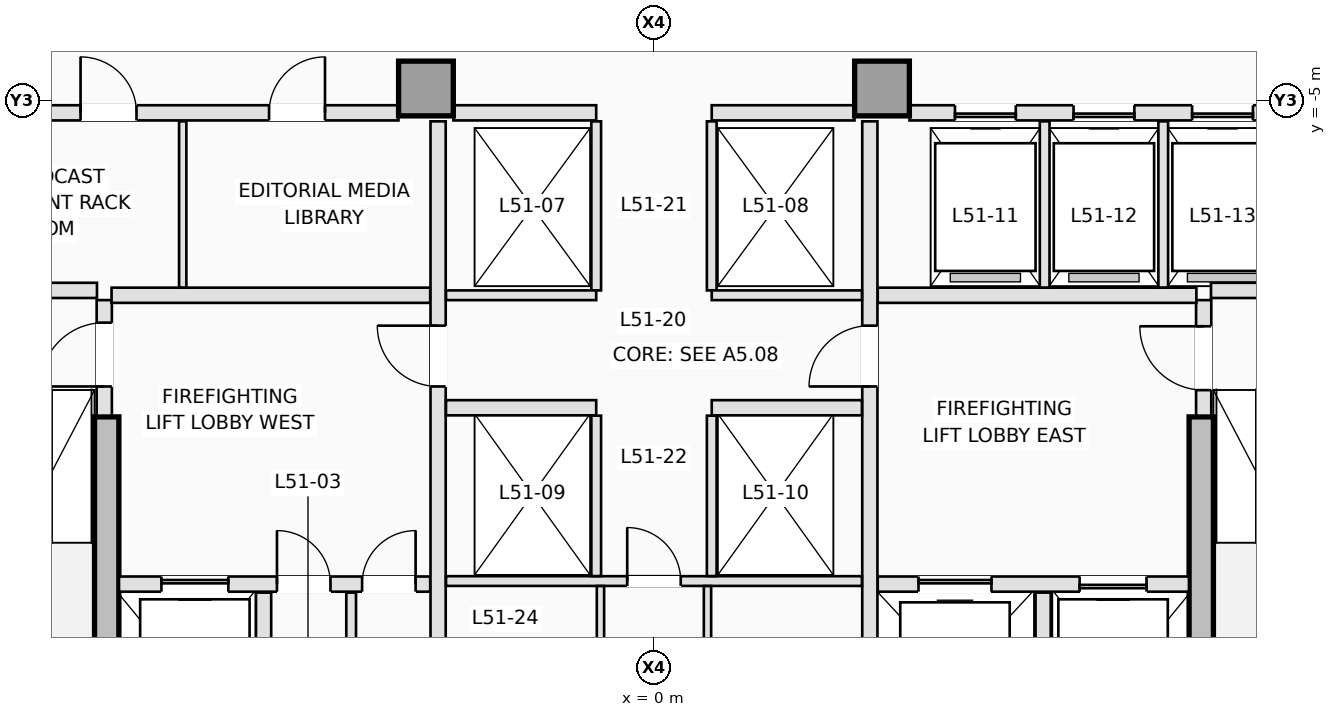
"""IFC4 building model, lengths in metres.
Left out: names, types, materials, properties, quantities, classifications, styles, units other than length and angle.
Written with IfcOpenShell. Run it as: python <this file> out.ifc"""

import sys

from ifc_helpers import new_model, si_unit, direction, frame, frame_2d, origin, origin_2d, place, context, subcontext, project, spatial, rectangle, extrude, element, fill, save


model = new_model("IFC4")
c1 = context("Model", 3, precision=1e-05, world=origin(), true_north=direction((0.0, 1.0)))
c2 = subcontext(c1, "Body", "Model", "MODEL_VIEW")
j1 = project(units=[si_unit("LENGTHUNIT", "METRE"), si_unit("PLANEANGLEUNIT", "RADIAN")], contexts=[c1])
p1 = place(None, origin())
s1 = spatial("IfcSite", under=j1, at=p1, CompositionType="ELEMENT")
p2 = place(p1, origin())
s2 = spatial("IfcBuilding", under=s1, at=p2, CompositionType="ELEMENT")
p3 = place(p2, frame((0.0, 0.0, 186.9)))
s3 = spatial("IfcBuildingStorey", under=s2, at=p3, CompositionType="ELEMENT", Elevation=186.9)
for number, where, z_axis, x_axis in (
    (1, (-9.0, -16.15, 0.0), (0.0, 0.0, 1.0), (0.0, 1.0, 0.0)),
    (2, (9.0, -16.15, 0.0), (0.0, 0.0, 1.0), (0.0, 1.0, 0.0)),
):
    element("IfcWall", number, at=place(p3, frame(where, z_axis=z_axis, x_axis=x_axis)), inside=s3, PredefinedType="SHEAR", context=c2, shape_type="SweptSolid", body=[
        extrude(rectangle(XDim=5.95, YDim=0.4, at=frame_2d((2.975, 0.0))), origin(), (0.0, 0.0, 1.0), 3.5),
    ])
for number, where, z_axis, x_axis in (
    (3, (-3.75, -4.8, 0.0), (0.0, 0.0, 1.0), (1.0, 0.0, 0.0)),
    (4, (3.75, -4.8, 0.0), (0.0, 0.0, 1.0), (1.0, 0.0, 0.0)),
):
    element("IfcColumn", number, at=place(p3, frame(where, z_axis=z_axis, x_axis=x_axis)), inside=s3, PredefinedType="COLUMN", context=c2, shape_type="SweptSolid", body=[
        extrude(rectangle(XDim=0.9, YDim=0.9, at=origin_2d()), origin(), (0.0, 0.0, 1.0), 3.5),
    ])
p4 = place(p3, frame((-9.04, -10.18, 0.0), z_axis=(0.0, 0.0, 1.0), x_axis=(0.0, 1.0, 0.0)))
e5 = element("IfcWall", 5, at=p4, inside=s3, PredefinedType="PARTITIONING", context=c2, shape_type="SweptSolid", body=[
    extrude(rectangle(XDim=1.9, YDim=0.25, at=frame_2d((0.95, 0.0))), origin(), (0.0, 0.0, 1.0), 3.25),
])
p5 = place(p4, frame((0.48, 0.0, 0.0)))
e6 = element("IfcOpeningElement", 6, at=p5, cuts=e5, PredefinedType="OPENING", context=c2, shape_type="SweptSolid", body=[
    extrude(rectangle(XDim=1.05, YDim=2.15, at=frame_2d((0.525, 1.075))), frame((0.0, 0.135, 0.0), z_axis=(0.0, -1.0, 0.0), x_axis=(1.0, 0.0, 0.0)), (0.0, 0.0, 1.0), 0.27),
])
p6 = place(p3, frame((9.04, -10.18, 0.0), z_axis=(0.0, 0.0, 1.0), x_axis=(0.0, 1.0, 0.0)))
e7 = element("IfcWall", 7, at=p6, inside=s3, PredefinedType="PARTITIONING", context=c2, shape_type="SweptSolid", body=[
    extrude(rectangle(XDim=1.9, YDim=0.25, at=frame_2d((0.95, 0.0))), origin(), (0.0, 0.0, 1.0), 3.25),
])
p7 = place(p6, frame((0.42, 0.0, 0.0)))
e8 = element("IfcOpeningElement", 8, at=p7, cuts=e7, PredefinedType="OPENING", context=c2, shape_type="SweptSolid", body=[
    extrude(rectangle(XDim=1.05, YDim=2.15, at=frame_2d((0.525, 1.075))), frame((0.0, 0.135, 0.0), z_axis=(0.0, -1.0, 0.0), x_axis=(1.0, 0.0, 0.0)), (0.0, 0.0, 1.0), 0.27),
])
for number, where, z_axis, x_axis in (
    (9, (-12.38, -8.12, 0.0), (0.0, 0.0, 1.0), (1.0, 0.0, 0.0)),
    (10, (9.16, -8.12, 0.0), (0.0, 0.0, 1.0), (1.0, 0.0, 0.0)),
):
    element("IfcWall", number, at=place(p3, frame(where, z_axis=z_axis, x_axis=x_axis)), inside=s3, PredefinedType="PARTITIONING", context=c2, shape_type="SweptSolid", body=[
        extrude(rectangle(XDim=3.22, YDim=0.25, at=frame_2d((1.61, 0.0))), origin(), (0.0, 0.0, 1.0), 3.25),
    ])
p8 = place(p3, frame((-8.798, -12.95, 0.0), z_axis=(0.0, 0.0, 1.0), x_axis=(1.0, 0.0, 0.0)))
e11 = element("IfcWall", 11, at=p8, inside=s3, PredefinedType="PARTITIONING", context=c2, shape_type="SweptSolid", body=[
    extrude(rectangle(XDim=5.118, YDim=0.25, at=frame_2d((2.559, 0.0))), origin(), (0.0, 0.0, 1.0), 3.25),
])
p9 = place(p8, frame((0.698, 0.0, 0.0)))
e12 = element("IfcOpeningElement", 12, at=p9, cuts=e11, PredefinedType="OPENING", context=c2, shape_type="SweptSolid", body=[
    extrude(rectangle(XDim=1.1, YDim=2.15, at=frame_2d((0.55, 1.075))), frame((0.0, 0.135, 0.0), z_axis=(0.0, -1.0, 0.0), x_axis=(1.0, 0.0, 0.0)), (0.0, 0.0, 1.0), 0.27),
])
p10 = place(p8, frame((2.598, 0.0, 0.0)))
e13 = element("IfcOpeningElement", 13, at=p10, cuts=e11, PredefinedType="OPENING", context=c2, shape_type="SweptSolid", body=[
    extrude(rectangle(XDim=0.88, YDim=2.1, at=frame_2d((0.44, 1.05))), frame((0.0, 0.135, 0.0), z_axis=(0.0, -1.0, 0.0), x_axis=(1.0, 0.0, 0.0)), (0.0, 0.0, 1.0), 0.27),
])
p11 = place(p8, frame((3.998, 0.0, 0.0)))
e14 = element("IfcOpeningElement", 14, at=p11, cuts=e11, PredefinedType="OPENING", context=c2, shape_type="SweptSolid", body=[
    extrude(rectangle(XDim=0.88, YDim=2.1, at=frame_2d((0.44, 1.05))), frame((0.0, 0.135, 0.0), z_axis=(0.0, -1.0, 0.0), x_axis=(1.0, 0.0, 0.0)), (0.0, 0.0, 1.0), 0.27),
])
p12 = place(p3, frame((3.68, -12.95, 0.0), z_axis=(0.0, 0.0, 1.0), x_axis=(1.0, 0.0, 0.0)))
e15 = element("IfcWall", 15, at=p12, inside=s3, PredefinedType="PARTITIONING", context=c2, shape_type="SweptSolid", body=[
    extrude(rectangle(XDim=5.118, YDim=0.25, at=frame_2d((2.559, 0.0))), origin(), (0.0, 0.0, 1.0), 3.25),
])
p13 = place(p12, frame((3.32, 0.0, 0.0)))
e16 = element("IfcOpeningElement", 16, at=p13, cuts=e15, PredefinedType="OPENING", context=c2, shape_type="SweptSolid", body=[
    extrude(rectangle(XDim=1.1, YDim=2.15, at=frame_2d((0.55, 1.075))), frame((0.0, 0.135, 0.0), z_axis=(0.0, -1.0, 0.0), x_axis=(1.0, 0.0, 0.0)), (0.0, 0.0, 1.0), 0.27),
])
p14 = place(p12, frame((0.67, 0.0, 0.0)))
e17 = element("IfcOpeningElement", 17, at=p14, cuts=e15, PredefinedType="OPENING", context=c2, shape_type="SweptSolid", body=[
    extrude(rectangle(XDim=1.2, YDim=2.15, at=frame_2d((0.6, 1.075))), frame((0.0, 0.135, 0.0), z_axis=(0.0, -1.0, 0.0), x_axis=(1.0, 0.0, 0.0)), (0.0, 0.0, 1.0), 0.27),
])
p15 = place(p3, frame((-6.42, -15.92, 0.0), z_axis=(0.0, 0.0, 1.0), x_axis=(0.0, 1.0, 0.0)))
e18 = element("IfcWall", 18, at=p15, inside=s3, PredefinedType="PARTITIONING", context=c2, shape_type="SweptSolid", body=[
    extrude(rectangle(XDim=2.83, YDim=0.25, at=frame_2d((1.415, 0.0))), origin(), (0.0, 0.0, 1.0), 3.25),
])
p16 = place(p3, frame((-4.98, -15.92, 0.0), z_axis=(0.0, 0.0, 1.0), x_axis=(0.0, 1.0, 0.0)))
e19 = element("IfcWall", 19, at=p16, inside=s3, PredefinedType="PARTITIONING", context=c2, shape_type="SweptSolid", body=[
    extrude(rectangle(XDim=2.83, YDim=0.16, at=frame_2d((1.415, 0.0))), origin(), (0.0, 0.0, 1.0), 3.25),
])
p17 = place(p3, frame((6.4, -15.92, 0.0), z_axis=(0.0, 0.0, 1.0), x_axis=(0.0, 1.0, 0.0)))
e20 = element("IfcWall", 20, at=p17, inside=s3, PredefinedType="PARTITIONING", context=c2, shape_type="SweptSolid", body=[
    extrude(rectangle(XDim=2.83, YDim=0.25, at=frame_2d((1.415, 0.0))), origin(), (0.0, 0.0, 1.0), 3.25),
])
for number, where, z_axis, x_axis in (
    (21, (-8.92, -8.2, 0.0), (0.0, 0.0, 1.0), (1.0, 0.0, 0.0)),
    (22, (3.68, -8.2, 0.0), (0.0, 0.0, 1.0), (1.0, 0.0, 0.0)),
):
    element("IfcWall", number, at=place(p3, frame(where, z_axis=z_axis, x_axis=x_axis)), inside=s3, PredefinedType="PARTITIONING", context=c2, shape_type="SweptSolid", body=[
        extrude(rectangle(XDim=5.24, YDim=0.25, at=frame_2d((2.62, 0.0))), origin(), (0.0, 0.0, 1.0), 3.25),
    ])
p18 = place(p3, frame((-3.55, -15.898, 0.0), z_axis=(0.0, 0.0, 1.0), x_axis=(0.0, 1.0, 0.0)))
e23 = element("IfcWall", 23, at=p18, inside=s3, PredefinedType="PARTITIONING", context=c2, shape_type="SweptSolid", body=[
    extrude(rectangle(XDim=10.558, YDim=0.25, at=frame_2d((5.279, 0.0))), origin(), (0.0, 0.0, 1.0), 3.25),
])
p19 = place(p18, frame((6.198, 0.0, 0.0)))
e24 = element("IfcOpeningElement", 24, at=p19, cuts=e23, PredefinedType="OPENING", context=c2, shape_type="SweptSolid", body=[
    extrude(rectangle(XDim=1.0, YDim=2.15, at=frame_2d((0.5, 1.075))), frame((0.0, 0.135, 0.0), z_axis=(0.0, -1.0, 0.0), x_axis=(1.0, 0.0, 0.0)), (0.0, 0.0, 1.0), 0.27),
])
p20 = place(p3, frame((3.55, -15.898, 0.0), z_axis=(0.0, 0.0, 1.0), x_axis=(0.0, 1.0, 0.0)))
e25 = element("IfcWall", 25, at=p20, inside=s3, PredefinedType="PARTITIONING", context=c2, shape_type="SweptSolid", body=[
    extrude(rectangle(XDim=10.558, YDim=0.25, at=frame_2d((5.279, 0.0))), origin(), (0.0, 0.0, 1.0), 3.25),
])
p21 = place(p20, frame((6.198, 0.0, 0.0)))
e26 = element("IfcOpeningElement", 26, at=p21, cuts=e25, PredefinedType="OPENING", context=c2, shape_type="SweptSolid", body=[
    extrude(rectangle(XDim=1.0, YDim=2.15, at=frame_2d((0.5, 1.075))), frame((0.0, 0.135, 0.0), z_axis=(0.0, -1.0, 0.0), x_axis=(1.0, 0.0, 0.0)), (0.0, 0.0, 1.0), 0.27),
])
p22 = place(p3, frame((-12.48, -5.2, 0.0), z_axis=(0.0, 0.0, 1.0), x_axis=(1.0, 0.0, 0.0)))
e27 = element("IfcWall", 27, at=p22, inside=s3, PredefinedType="PARTITIONING", context=c2, shape_type="SweptSolid", body=[
    extrude(rectangle(XDim=8.278, YDim=0.25, at=frame_2d((4.139, 0.0))), origin(), (0.0, 0.0, 1.0), 3.25),
])
p23 = place(p22, frame((3.05, 0.0, 0.0)))
e28 = element("IfcOpeningElement", 28, at=p23, cuts=e27, PredefinedType="OPENING", context=c2, shape_type="SweptSolid", body=[
    extrude(rectangle(XDim=0.92, YDim=2.12, at=frame_2d((0.46, 1.06))), frame((0.0, 0.135, 0.0), z_axis=(0.0, -1.0, 0.0), x_axis=(1.0, 0.0, 0.0)), (0.0, 0.0, 1.0), 0.27),
])
p24 = place(p22, frame((6.15, 0.0, 0.0)))
e29 = element("IfcOpeningElement", 29, at=p24, cuts=e27, PredefinedType="OPENING", context=c2, shape_type="SweptSolid", body=[
    extrude(rectangle(XDim=0.92, YDim=2.12, at=frame_2d((0.46, 1.06))), frame((0.0, 0.135, 0.0), z_axis=(0.0, -1.0, 0.0), x_axis=(1.0, 0.0, 0.0)), (0.0, 0.0, 1.0), 0.27),
])
p25 = place(p3, frame((4.202, -5.2, 0.0), z_axis=(0.0, 0.0, 1.0), x_axis=(1.0, 0.0, 0.0)))
e30 = element("IfcWall", 30, at=p25, inside=s3, PredefinedType="PARTITIONING", context=c2, shape_type="SweptSolid", body=[
    extrude(rectangle(XDim=8.278, YDim=0.25, at=frame_2d((4.139, 0.0))), origin(), (0.0, 0.0, 1.0), 3.25),
])
p26 = place(p25, frame((0.748, 0.0, 0.0)))
e31 = element("IfcOpeningElement", 31, at=p26, cuts=e30, PredefinedType="OPENING", context=c2, shape_type="SweptSolid", body=[
    extrude(rectangle(XDim=1.0, YDim=2.15, at=frame_2d((0.5, 1.075))), frame((0.0, 0.135, 0.0), z_axis=(0.0, -1.0, 0.0), x_axis=(1.0, 0.0, 0.0)), (0.0, 0.0, 1.0), 0.27),
])
p27 = place(p25, frame((2.698, 0.0, 0.0)))
e32 = element("IfcOpeningElement", 32, at=p27, cuts=e30, PredefinedType="OPENING", context=c2, shape_type="SweptSolid", body=[
    extrude(rectangle(XDim=1.0, YDim=2.15, at=frame_2d((0.5, 1.075))), frame((0.0, 0.135, 0.0), z_axis=(0.0, -1.0, 0.0), x_axis=(1.0, 0.0, 0.0)), (0.0, 0.0, 1.0), 0.27),
])
p28 = place(p25, frame((4.648, 0.0, 0.0)))
e33 = element("IfcOpeningElement", 33, at=p28, cuts=e30, PredefinedType="OPENING", context=c2, shape_type="SweptSolid", body=[
    extrude(rectangle(XDim=1.0, YDim=2.15, at=frame_2d((0.5, 1.075))), frame((0.0, 0.135, 0.0), z_axis=(0.0, -1.0, 0.0), x_axis=(1.0, 0.0, 0.0)), (0.0, 0.0, 1.0), 0.27),
])
p29 = place(p25, frame((6.598, 0.0, 0.0)))
e34 = element("IfcOpeningElement", 34, at=p29, cuts=e30, PredefinedType="OPENING", context=c2, shape_type="SweptSolid", body=[
    extrude(rectangle(XDim=1.0, YDim=2.15, at=frame_2d((0.5, 1.075))), frame((0.0, 0.135, 0.0), z_axis=(0.0, -1.0, 0.0), x_axis=(1.0, 0.0, 0.0)), (0.0, 0.0, 1.0), 0.27),
])
for number, where, z_axis, x_axis in (
    (35, (-3.298, -5.2, 0.0), (0.0, 0.0, 1.0), (1.0, 0.0, 0.0)),
    (36, (0.95, -5.2, 0.0), (0.0, 0.0, 1.0), (1.0, 0.0, 0.0)),
):
    element("IfcWall", number, at=place(p3, frame(where, z_axis=z_axis, x_axis=x_axis)), inside=s3, PredefinedType="PARTITIONING", context=c2, shape_type="SweptSolid", body=[
        extrude(rectangle(XDim=2.348, YDim=0.25, at=frame_2d((1.174, 0.0))), origin(), (0.0, 0.0, 1.0), 3.25),
    ])
p30 = place(p3, frame((-7.75, -8.073, 0.0), z_axis=(0.0, 0.0, 1.0), x_axis=(0.0, 1.0, 0.0)))
e37 = element("IfcWall", 37, at=p30, inside=s3, PredefinedType="PARTITIONING", context=c2, shape_type="SweptSolid", body=[
    extrude(rectangle(XDim=2.733, YDim=0.12, at=frame_2d((1.366, 0.0))), origin(), (0.0, 0.0, 1.0), 3.25),
])
for number, where, z_axis, x_axis in (
    (38, (6.425, -8.073, 0.0), (0.0, 0.0, 1.0), (0.0, 1.0, 0.0)),
    (39, (8.375, -8.073, 0.0), (0.0, 0.0, 1.0), (0.0, 1.0, 0.0)),
):
    element("IfcWall", number, at=place(p3, frame(where, z_axis=z_axis, x_axis=x_axis)), inside=s3, PredefinedType="PARTITIONING", context=c2, shape_type="SweptSolid", body=[
        extrude(rectangle(XDim=2.733, YDim=0.16, at=frame_2d((1.366, 0.0))), origin(), (0.0, 0.0, 1.0), 3.25),
    ])
for number, where, z_axis, x_axis in (
    (40, (-0.95, -8.12, 0.0), (0.0, 0.0, 1.0), (0.0, 1.0, 0.0)),
    (41, (0.95, -8.12, 0.0), (0.0, 0.0, 1.0), (0.0, 1.0, 0.0)),
):
    element("IfcWall", number, at=place(p3, frame(where, z_axis=z_axis, x_axis=x_axis)), inside=s3, PredefinedType="PARTITIONING", context=c2, shape_type="SweptSolid", body=[
        extrude(rectangle(XDim=2.78, YDim=0.16, at=frame_2d((1.39, 0.0))), origin(), (0.0, 0.0, 1.0), 3.25),
    ])
for number, where, z_axis, x_axis in (
    (42, (-3.42, -8.2, 0.0), (0.0, 0.0, 1.0), (1.0, 0.0, 0.0)),
    (43, (0.95, -8.2, 0.0), (0.0, 0.0, 1.0), (1.0, 0.0, 0.0)),
):
    element("IfcWall", number, at=place(p3, frame(where, z_axis=z_axis, x_axis=x_axis)), inside=s3, PredefinedType="PARTITIONING", context=c2, shape_type="SweptSolid", body=[
        extrude(rectangle(XDim=2.47, YDim=0.16, at=frame_2d((1.235, 0.0))), origin(), (0.0, 0.0, 1.0), 3.25),
    ])
for number, where, z_axis, x_axis in (
    (44, (-3.42, -10.05, 0.0), (0.0, 0.0, 1.0), (1.0, 0.0, 0.0)),
    (45, (0.95, -10.05, 0.0), (0.0, 0.0, 1.0), (1.0, 0.0, 0.0)),
):
    element("IfcWall", number, at=place(p3, frame(where, z_axis=z_axis, x_axis=x_axis)), inside=s3, PredefinedType="PARTITIONING", context=c2, shape_type="SweptSolid", body=[
        extrude(rectangle(XDim=2.47, YDim=0.25, at=frame_2d((1.235, 0.0))), origin(), (0.0, 0.0, 1.0), 3.25),
    ])
p31 = place(p3, frame((-3.42, -12.9, 0.0), z_axis=(0.0, 0.0, 1.0), x_axis=(1.0, 0.0, 0.0)))
e46 = element("IfcWall", 46, at=p31, inside=s3, PredefinedType="PARTITIONING", context=c2, shape_type="SweptSolid", body=[
    extrude(rectangle(XDim=6.84, YDim=0.16, at=frame_2d((3.42, 0.0))), origin(), (0.0, 0.0, 1.0), 3.25),
])
p32 = place(p31, frame((2.98, 0.0, 0.0)))
e47 = element("IfcOpeningElement", 47, at=p32, cuts=e46, PredefinedType="OPENING", context=c2, shape_type="SweptSolid", body=[
    extrude(rectangle(XDim=0.88, YDim=2.12, at=frame_2d((0.44, 1.06))), frame((0.0, 0.09, 0.0), z_axis=(0.0, -1.0, 0.0), x_axis=(1.0, 0.0, 0.0)), (0.0, 0.0, 1.0), 0.18),
])
for number, where, z_axis, x_axis in (
    (48, (-0.95, -12.818, 0.0), (0.0, 0.0, 1.0), (0.0, 1.0, 0.0)),
    (49, (0.95, -12.818, 0.0), (0.0, 0.0, 1.0), (0.0, 1.0, 0.0)),
):
    element("IfcWall", number, at=place(p3, frame(where, z_axis=z_axis, x_axis=x_axis)), inside=s3, PredefinedType="PARTITIONING", context=c2, shape_type="SweptSolid", body=[
        extrude(rectangle(XDim=2.638, YDim=0.16, at=frame_2d((1.319, 0.0))), origin(), (0.0, 0.0, 1.0), 3.25),
    ])
p33 = place(p3, frame((-0.88, -16.02, 0.0), z_axis=(0.0, 0.0, 1.0), x_axis=(0.0, 1.0, 0.0)))
e50 = element("IfcWall", 50, at=p33, inside=s3, PredefinedType="PARTITIONING", context=c2, shape_type="SweptSolid", body=[
    extrude(rectangle(XDim=3.038, YDim=0.12, at=frame_2d((1.519, 0.0))), origin(), (0.0, 0.0, 1.0), 3.25),
])
p34 = place(p33, frame((1.05, 0.0, 0.0)))
e51 = element("IfcOpeningElement", 51, at=p34, cuts=e50, PredefinedType="OPENING", context=c2, shape_type="SweptSolid", body=[
    extrude(rectangle(XDim=0.88, YDim=2.12, at=frame_2d((0.44, 1.06))), frame((0.0, 0.07, 0.0), z_axis=(0.0, -1.0, 0.0), x_axis=(1.0, 0.0, 0.0)), (0.0, 0.0, 1.0), 0.14),
])
p35 = place(p3, frame((0.88, -16.02, 0.0), z_axis=(0.0, 0.0, 1.0), x_axis=(0.0, 1.0, 0.0)))
e52 = element("IfcWall", 52, at=p35, inside=s3, PredefinedType="PARTITIONING", context=c2, shape_type="SweptSolid", body=[
    extrude(rectangle(XDim=3.038, YDim=0.12, at=frame_2d((1.519, 0.0))), origin(), (0.0, 0.0, 1.0), 3.25),
])
p36 = place(p35, frame((1.05, 0.0, 0.0)))
e53 = element("IfcOpeningElement", 53, at=p36, cuts=e52, PredefinedType="OPENING", context=c2, shape_type="SweptSolid", body=[
    extrude(rectangle(XDim=0.88, YDim=2.12, at=frame_2d((0.44, 1.06))), frame((0.0, 0.07, 0.0), z_axis=(0.0, -1.0, 0.0), x_axis=(1.0, 0.0, 0.0)), (0.0, 0.0, 1.0), 0.14),
])
p37 = place(p26, origin())
e54 = element("IfcDoor", 54, at=p37, inside=s3, OperationType="SLIDING_TO_RIGHT", PredefinedType="DOOR", context=c2, shape_type="SweptSolid", body=[
    extrude(rectangle(XDim=1.0, YDim=2.15, at=frame_2d((0.5, 1.075))), frame((0.0, 0.025, 0.0), z_axis=(0.0, -1.0, 0.0), x_axis=(1.0, 0.0, 0.0)), (0.0, 0.0, 1.0), 0.05),
])
fill(e31, e54)
p38 = place(p27, origin())
e55 = element("IfcDoor", 55, at=p38, inside=s3, OperationType="SLIDING_TO_RIGHT", PredefinedType="DOOR", context=c2, shape_type="SweptSolid", body=[
    extrude(rectangle(XDim=1.0, YDim=2.15, at=frame_2d((0.5, 1.075))), frame((0.0, 0.025, 0.0), z_axis=(0.0, -1.0, 0.0), x_axis=(1.0, 0.0, 0.0)), (0.0, 0.0, 1.0), 0.05),
])
fill(e32, e55)
p39 = place(p28, origin())
e56 = element("IfcDoor", 56, at=p39, inside=s3, OperationType="SLIDING_TO_RIGHT", PredefinedType="DOOR", context=c2, shape_type="SweptSolid", body=[
    extrude(rectangle(XDim=1.0, YDim=2.15, at=frame_2d((0.5, 1.075))), frame((0.0, 0.025, 0.0), z_axis=(0.0, -1.0, 0.0), x_axis=(1.0, 0.0, 0.0)), (0.0, 0.0, 1.0), 0.05),
])
fill(e33, e56)
p40 = place(p9, origin())
e57 = element("IfcDoor", 57, at=p40, inside=s3, OperationType="SLIDING_TO_LEFT", PredefinedType="DOOR", context=c2, shape_type="SweptSolid", body=[
    extrude(rectangle(XDim=1.1, YDim=2.15, at=frame_2d((0.55, 1.075))), frame((0.0, 0.025, 0.0), z_axis=(0.0, -1.0, 0.0), x_axis=(1.0, 0.0, 0.0)), (0.0, 0.0, 1.0), 0.05),
])
fill(e12, e57)
p41 = place(p13, origin())
e58 = element("IfcDoor", 58, at=p41, inside=s3, OperationType="SLIDING_TO_RIGHT", PredefinedType="DOOR", context=c2, shape_type="SweptSolid", body=[
    extrude(rectangle(XDim=1.1, YDim=2.15, at=frame_2d((0.55, 1.075))), frame((0.0, 0.025, 0.0), z_axis=(0.0, -1.0, 0.0), x_axis=(1.0, 0.0, 0.0)), (0.0, 0.0, 1.0), 0.05),
])
fill(e16, e58)
p42 = place(p14, origin())
e59 = element("IfcDoor", 59, at=p42, inside=s3, OperationType="SLIDING_TO_LEFT", PredefinedType="DOOR", context=c2, shape_type="SweptSolid", body=[
    extrude(rectangle(XDim=1.2, YDim=2.15, at=frame_2d((0.6, 1.075))), frame((0.0, 0.025, 0.0), z_axis=(0.0, -1.0, 0.0), x_axis=(1.0, 0.0, 0.0)), (0.0, 0.0, 1.0), 0.05),
])
fill(e17, e59)
p43 = place(p5, origin())
e60 = element("IfcDoor", 60, at=p43, inside=s3, OperationType="SINGLE_SWING_LEFT", PredefinedType="DOOR", context=c2, shape_type="SweptSolid", body=[
    extrude(rectangle(XDim=1.05, YDim=2.15, at=frame_2d((0.525, 1.075))), frame((0.0, 0.025, 0.0), z_axis=(0.0, -1.0, 0.0), x_axis=(1.0, 0.0, 0.0)), (0.0, 0.0, 1.0), 0.05),
])
fill(e6, e60)
p44 = place(p7, origin())
e61 = element("IfcDoor", 61, at=p44, inside=s3, OperationType="SINGLE_SWING_RIGHT", PredefinedType="DOOR", context=c2, shape_type="SweptSolid", body=[
    extrude(rectangle(XDim=1.05, YDim=2.15, at=frame_2d((0.525, 1.075))), frame((0.0, 0.025, 0.0), z_axis=(0.0, -1.0, 0.0), x_axis=(1.0, 0.0, 0.0)), (0.0, 0.0, 1.0), 0.05),
])
fill(e8, e61)
p45 = place(p10, origin())
e62 = element("IfcDoor", 62, at=p45, inside=s3, OperationType="SINGLE_SWING_LEFT", PredefinedType="TRAPDOOR", context=c2, shape_type="SweptSolid", body=[
    extrude(rectangle(XDim=0.88, YDim=2.1, at=frame_2d((0.44, 1.05))), frame((0.0, 0.025, 0.0), z_axis=(0.0, -1.0, 0.0), x_axis=(1.0, 0.0, 0.0)), (0.0, 0.0, 1.0), 0.05),
])
fill(e13, e62)
p46 = place(p11, origin())
e63 = element("IfcDoor", 63, at=p46, inside=s3, OperationType="SINGLE_SWING_RIGHT", PredefinedType="TRAPDOOR", context=c2, shape_type="SweptSolid", body=[
    extrude(rectangle(XDim=0.88, YDim=2.1, at=frame_2d((0.44, 1.05))), frame((0.0, 0.025, 0.0), z_axis=(0.0, -1.0, 0.0), x_axis=(1.0, 0.0, 0.0)), (0.0, 0.0, 1.0), 0.05),
])
fill(e14, e63)
p47 = place(p19, origin())
e64 = element("IfcDoor", 64, at=p47, inside=s3, OperationType="SINGLE_SWING_RIGHT", PredefinedType="DOOR", context=c2, shape_type="SweptSolid", body=[
    extrude(rectangle(XDim=1.0, YDim=2.15, at=frame_2d((0.5, 1.075))), frame((0.0, 0.025, 0.0), z_axis=(0.0, -1.0, 0.0), x_axis=(1.0, 0.0, 0.0)), (0.0, 0.0, 1.0), 0.05),
])
fill(e24, e64)
p48 = place(p21, origin())
e65 = element("IfcDoor", 65, at=p48, inside=s3, OperationType="SINGLE_SWING_LEFT", PredefinedType="DOOR", context=c2, shape_type="SweptSolid", body=[
    extrude(rectangle(XDim=1.0, YDim=2.15, at=frame_2d((0.5, 1.075))), frame((0.0, 0.025, 0.0), z_axis=(0.0, -1.0, 0.0), x_axis=(1.0, 0.0, 0.0)), (0.0, 0.0, 1.0), 0.05),
])
fill(e26, e65)
p49 = place(p23, origin())
e66 = element("IfcDoor", 66, at=p49, inside=s3, OperationType="SINGLE_SWING_LEFT", PredefinedType="DOOR", context=c2, shape_type="SweptSolid", body=[
    extrude(rectangle(XDim=0.92, YDim=2.12, at=frame_2d((0.46, 1.06))), frame((0.0, 0.025, 0.0), z_axis=(0.0, -1.0, 0.0), x_axis=(1.0, 0.0, 0.0)), (0.0, 0.0, 1.0), 0.05),
])
fill(e28, e66)
p50 = place(p24, origin())
e67 = element("IfcDoor", 67, at=p50, inside=s3, OperationType="SINGLE_SWING_RIGHT", PredefinedType="DOOR", context=c2, shape_type="SweptSolid", body=[
    extrude(rectangle(XDim=0.92, YDim=2.12, at=frame_2d((0.46, 1.06))), frame((0.0, 0.025, 0.0), z_axis=(0.0, -1.0, 0.0), x_axis=(1.0, 0.0, 0.0)), (0.0, 0.0, 1.0), 0.05),
])
fill(e29, e67)
p51 = place(p32, origin())
e68 = element("IfcDoor", 68, at=p51, inside=s3, OperationType="SINGLE_SWING_LEFT", PredefinedType="DOOR", context=c2, shape_type="SweptSolid", body=[
    extrude(rectangle(XDim=0.88, YDim=2.12, at=frame_2d((0.44, 1.06))), frame((0.0, 0.025, 0.0), z_axis=(0.0, -1.0, 0.0), x_axis=(1.0, 0.0, 0.0)), (0.0, 0.0, 1.0), 0.05),
])
fill(e47, e68)
save(model, sys.argv[1])
